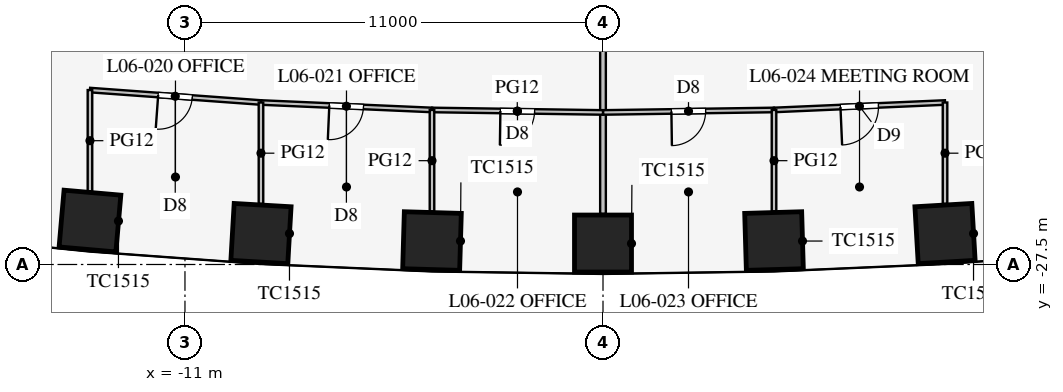
"""IFC4 building model, lengths in metres.
Left out: names, types, materials, properties, quantities, classifications, styles, units other than length and angle.
Written with IfcOpenShell. Run it as: python <this file> out.ifc"""

import sys

from ifc_helpers import new_model, si_unit, direction, frame, frame_2d, origin, origin_2d, place, context, subcontext, project, spatial, rectangle, extrude, element, fill, save


model = new_model("IFC4")
c1 = context("Model", 3, precision=1e-05, world=origin(), true_north=direction((0.0, 1.0)))
c2 = subcontext(c1, "Body", "Model", "MODEL_VIEW")
j1 = project(units=[si_unit("LENGTHUNIT", "METRE"), si_unit("PLANEANGLEUNIT", "RADIAN")], contexts=[c1])
p1 = place(None, origin())
s1 = spatial("IfcSite", under=j1, at=p1, CompositionType="ELEMENT")
p2 = place(p1, origin())
s2 = spatial("IfcBuilding", under=s1, at=p2, CompositionType="ELEMENT")
p3 = place(p2, frame((0.0, 0.0, 29.1)))
s3 = spatial("IfcBuildingStorey", under=s2, at=p3, CompositionType="ELEMENT", Elevation=29.1)
for number, where, z_axis, x_axis in (
    (1, (-13.5, -26.357, 0.0), (0.0, 0.0, 1.0), (0.996, -0.087, 0.0)),
    (2, (-9.0, -26.686, 0.0), (0.0, 0.0, 1.0), (0.998, -0.058, 0.0)),
    (3, (-4.5, -26.883, 0.0), (0.0, 0.0, 1.0), (1.0, -0.029, 0.0)),
    (4, (0.0, -26.949, 0.0), (0.0, 0.0, 1.0), (1.0, 0.0, 0.0)),
    (5, (4.5, -26.883, 0.0), (0.0, 0.0, 1.0), (1.0, 0.029, 0.0)),
    (6, (9.0, -26.686, 0.0), (0.0, 0.0, 1.0), (0.998, 0.058, 0.0)),
):
    element("IfcColumn", number, at=place(p3, frame(where, z_axis=z_axis, x_axis=x_axis)), inside=s3, PredefinedType="COLUMN", context=c2, shape_type="SweptSolid", body=[
        extrude(rectangle(XDim=1.5, YDim=1.5, at=origin_2d()), origin(), (0.0, 0.0, 1.0), 4.2),
    ])
p4 = place(p3, frame((0.0, -13.41, 0.0), z_axis=(0.0, 0.0, 1.0), x_axis=(0.0, -1.0, 0.0)))
e7 = element("IfcWall", 7, at=p4, inside=s3, PredefinedType="PARTITIONING", context=c2, shape_type="SweptSolid", body=[
    extrude(rectangle(XDim=12.759, YDim=0.15, at=frame_2d((6.379, 0.0))), origin(), (0.0, 0.0, 1.0), 3.2),
])
p5 = place(p3, frame((0.0, -23.499, 0.0), z_axis=(0.0, 0.0, 1.0), x_axis=(0.999894311967, 0.014538393859, 0.0)))
e8 = element("IfcWall", 8, at=p5, inside=s3, PredefinedType="PARTITIONING", context=c2, shape_type="SweptSolid", body=[
    extrude(rectangle(XDim=4.5, YDim=0.12, at=frame_2d((2.25, 0.0))), origin(), (0.0, 0.0, 1.0), 2.9),
])
p6 = place(p5, frame((1.8, 0.0, 0.15)))
e9 = element("IfcOpeningElement", 9, at=p6, cuts=e8, PredefinedType="OPENING", context=c2, shape_type="SweptSolid", body=[
    extrude(rectangle(XDim=0.9, YDim=2.1, at=frame_2d((0.45, 1.05))), frame((0.0, 0.07, 0.0), z_axis=(0.0, -1.0, 0.0), x_axis=(1.0, 0.0, 0.0)), (0.0, 0.0, 1.0), 0.14),
])
p7 = place(p3, frame((4.5, -23.433, 0.0), z_axis=(0.0, 0.0, 1.0), x_axis=(0.999052370647, 0.043524254212, 0.0)))
e10 = element("IfcWall", 10, at=p7, inside=s3, PredefinedType="PARTITIONING", context=c2, shape_type="SweptSolid", body=[
    extrude(rectangle(XDim=4.504, YDim=0.12, at=frame_2d((2.252, 0.0))), origin(), (0.0, 0.0, 1.0), 2.9),
])
p8 = place(p7, frame((1.75, 0.0, 0.15)))
e11 = element("IfcOpeningElement", 11, at=p8, cuts=e10, PredefinedType="OPENING", context=c2, shape_type="SweptSolid", body=[
    extrude(rectangle(XDim=1.0, YDim=2.1, at=frame_2d((0.5, 1.05))), frame((0.0, 0.07, 0.0), z_axis=(0.0, -1.0, 0.0), x_axis=(1.0, 0.0, 0.0)), (0.0, 0.0, 1.0), 0.14),
])
p9 = place(p3, frame((-13.5, -22.91, 0.0), z_axis=(0.0, 0.0, 1.0), x_axis=(0.997363894896, -0.072562119306, 0.0)))
e12 = element("IfcWall", 12, at=p9, inside=s3, PredefinedType="PARTITIONING", context=c2, shape_type="SweptSolid", body=[
    extrude(rectangle(XDim=4.512, YDim=0.12, at=frame_2d((2.256, 0.0))), origin(), (0.0, 0.0, 1.0), 2.9),
])
p10 = place(p9, frame((1.8, 0.0, 0.15)))
e13 = element("IfcOpeningElement", 13, at=p10, cuts=e12, PredefinedType="OPENING", context=c2, shape_type="SweptSolid", body=[
    extrude(rectangle(XDim=0.9, YDim=2.1, at=frame_2d((0.45, 1.05))), frame((0.0, 0.07, 0.0), z_axis=(0.0, -1.0, 0.0), x_axis=(1.0, 0.0, 0.0)), (0.0, 0.0, 1.0), 0.14),
])
p11 = place(p3, frame((-4.5, -23.433, 0.0), z_axis=(0.0, 0.0, 1.0), x_axis=(0.999894311967, -0.014538393859, 0.0)))
e14 = element("IfcWall", 14, at=p11, inside=s3, PredefinedType="PARTITIONING", context=c2, shape_type="SweptSolid", body=[
    extrude(rectangle(XDim=4.5, YDim=0.12, at=frame_2d((2.25, 0.0))), origin(), (0.0, 0.0, 1.0), 2.9),
])
p12 = place(p11, frame((1.8, 0.0, 0.15)))
e15 = element("IfcOpeningElement", 15, at=p12, cuts=e14, PredefinedType="OPENING", context=c2, shape_type="SweptSolid", body=[
    extrude(rectangle(XDim=0.9, YDim=2.1, at=frame_2d((0.45, 1.05))), frame((0.0, 0.07, 0.0), z_axis=(0.0, -1.0, 0.0), x_axis=(1.0, 0.0, 0.0)), (0.0, 0.0, 1.0), 0.14),
])
p13 = place(p3, frame((-9.0, -23.237, 0.0), z_axis=(0.0, 0.0, 1.0), x_axis=(0.999052370647, -0.043524254212, 0.0)))
e16 = element("IfcWall", 16, at=p13, inside=s3, PredefinedType="PARTITIONING", context=c2, shape_type="SweptSolid", body=[
    extrude(rectangle(XDim=4.504, YDim=0.12, at=frame_2d((2.252, 0.0))), origin(), (0.0, 0.0, 1.0), 2.9),
])
p14 = place(p13, frame((1.8, 0.0, 0.15)))
e17 = element("IfcOpeningElement", 17, at=p14, cuts=e16, PredefinedType="OPENING", context=c2, shape_type="SweptSolid", body=[
    extrude(rectangle(XDim=0.9, YDim=2.1, at=frame_2d((0.45, 1.05))), frame((0.0, 0.07, 0.0), z_axis=(0.0, -1.0, 0.0), x_axis=(1.0, 0.0, 0.0)), (0.0, 0.0, 1.0), 0.14),
])
p15 = place(p3, frame((4.5, -23.433, 0.0), z_axis=(0.0, 0.0, 1.0), x_axis=(0.0, -1.0, 0.0)))
e18 = element("IfcWall", 18, at=p15, inside=s3, PredefinedType="PARTITIONING", context=c2, shape_type="SweptSolid", body=[
    extrude(rectangle(XDim=2.669, YDim=0.12, at=frame_2d((1.335, 0.0))), origin(), (0.0, 0.0, 1.0), 2.9),
])
p16 = place(p3, frame((9.0, -23.237, 0.0), z_axis=(0.0, 0.0, 1.0), x_axis=(0.0, -1.0, 0.0)))
e19 = element("IfcWall", 19, at=p16, inside=s3, PredefinedType="PARTITIONING", context=c2, shape_type="SweptSolid", body=[
    extrude(rectangle(XDim=2.667, YDim=0.12, at=frame_2d((1.334, 0.0))), origin(), (0.0, 0.0, 1.0), 2.9),
])
p17 = place(p3, frame((-13.5, -22.91, 0.0), z_axis=(0.0, 0.0, 1.0), x_axis=(0.0, -1.0, 0.0)))
e20 = element("IfcWall", 20, at=p17, inside=s3, PredefinedType="PARTITIONING", context=c2, shape_type="SweptSolid", body=[
    extrude(rectangle(XDim=2.664, YDim=0.12, at=frame_2d((1.332, 0.0))), origin(), (0.0, 0.0, 1.0), 2.9),
])
p18 = place(p3, frame((-4.5, -23.433, 0.0), z_axis=(0.0, 0.0, 1.0), x_axis=(0.0, -1.0, 0.0)))
e21 = element("IfcWall", 21, at=p18, inside=s3, PredefinedType="PARTITIONING", context=c2, shape_type="SweptSolid", body=[
    extrude(rectangle(XDim=2.669, YDim=0.12, at=frame_2d((1.335, 0.0))), origin(), (0.0, 0.0, 1.0), 2.9),
])
p19 = place(p3, frame((-9.0, -23.237, 0.0), z_axis=(0.0, 0.0, 1.0), x_axis=(0.0, -1.0, 0.0)))
e22 = element("IfcWall", 22, at=p19, inside=s3, PredefinedType="PARTITIONING", context=c2, shape_type="SweptSolid", body=[
    extrude(rectangle(XDim=2.667, YDim=0.12, at=frame_2d((1.334, 0.0))), origin(), (0.0, 0.0, 1.0), 2.9),
])
p20 = place(p10, frame((0.9, 0.0, 0.0), z_axis=(0.0, 0.0, 1.0), x_axis=(-1.0, 0.0, 0.0)))
e23 = element("IfcDoor", 23, at=p20, inside=s3, OperationType="SINGLE_SWING_RIGHT", PredefinedType="DOOR", context=c2, shape_type="SweptSolid", body=[
    extrude(rectangle(XDim=0.9, YDim=2.1, at=frame_2d((0.45, 1.05))), frame((0.0, 0.025, 0.0), z_axis=(0.0, -1.0, 0.0), x_axis=(1.0, 0.0, 0.0)), (0.0, 0.0, 1.0), 0.05),
])
fill(e13, e23)
p21 = place(p14, frame((0.9, 0.0, 0.0), z_axis=(0.0, 0.0, 1.0), x_axis=(-1.0, 0.0, 0.0)))
e24 = element("IfcDoor", 24, at=p21, inside=s3, OperationType="SINGLE_SWING_RIGHT", PredefinedType="DOOR", context=c2, shape_type="SweptSolid", body=[
    extrude(rectangle(XDim=0.9, YDim=2.1, at=frame_2d((0.45, 1.05))), frame((0.0, 0.025, 0.0), z_axis=(0.0, -1.0, 0.0), x_axis=(1.0, 0.0, 0.0)), (0.0, 0.0, 1.0), 0.05),
])
fill(e17, e24)
p22 = place(p12, frame((0.9, 0.0, 0.0), z_axis=(0.0, 0.0, 1.0), x_axis=(-1.0, 0.0, 0.0)))
e25 = element("IfcDoor", 25, at=p22, inside=s3, OperationType="SINGLE_SWING_RIGHT", PredefinedType="DOOR", context=c2, shape_type="SweptSolid", body=[
    extrude(rectangle(XDim=0.9, YDim=2.1, at=frame_2d((0.45, 1.05))), frame((0.0, 0.025, 0.0), z_axis=(0.0, -1.0, 0.0), x_axis=(1.0, 0.0, 0.0)), (0.0, 0.0, 1.0), 0.05),
])
fill(e15, e25)
p23 = place(p6, frame((0.9, 0.0, 0.0), z_axis=(0.0, 0.0, 1.0), x_axis=(-1.0, 0.0, 0.0)))
e26 = element("IfcDoor", 26, at=p23, inside=s3, OperationType="SINGLE_SWING_RIGHT", PredefinedType="DOOR", context=c2, shape_type="SweptSolid", body=[
    extrude(rectangle(XDim=0.9, YDim=2.1, at=frame_2d((0.45, 1.05))), frame((0.0, 0.025, 0.0), z_axis=(0.0, -1.0, 0.0), x_axis=(1.0, 0.0, 0.0)), (0.0, 0.0, 1.0), 0.05),
])
fill(e9, e26)
p24 = place(p8, frame((1.0, 0.0, 0.0), z_axis=(0.0, 0.0, 1.0), x_axis=(-1.0, 0.0, 0.0)))
e27 = element("IfcDoor", 27, at=p24, inside=s3, OperationType="SINGLE_SWING_RIGHT", PredefinedType="DOOR", context=c2, shape_type="SweptSolid", body=[
    extrude(rectangle(XDim=1.0, YDim=2.1, at=frame_2d((0.5, 1.05))), frame((0.0, 0.025, 0.0), z_axis=(0.0, -1.0, 0.0), x_axis=(1.0, 0.0, 0.0)), (0.0, 0.0, 1.0), 0.05),
])
fill(e11, e27)
save(model, sys.argv[1])
